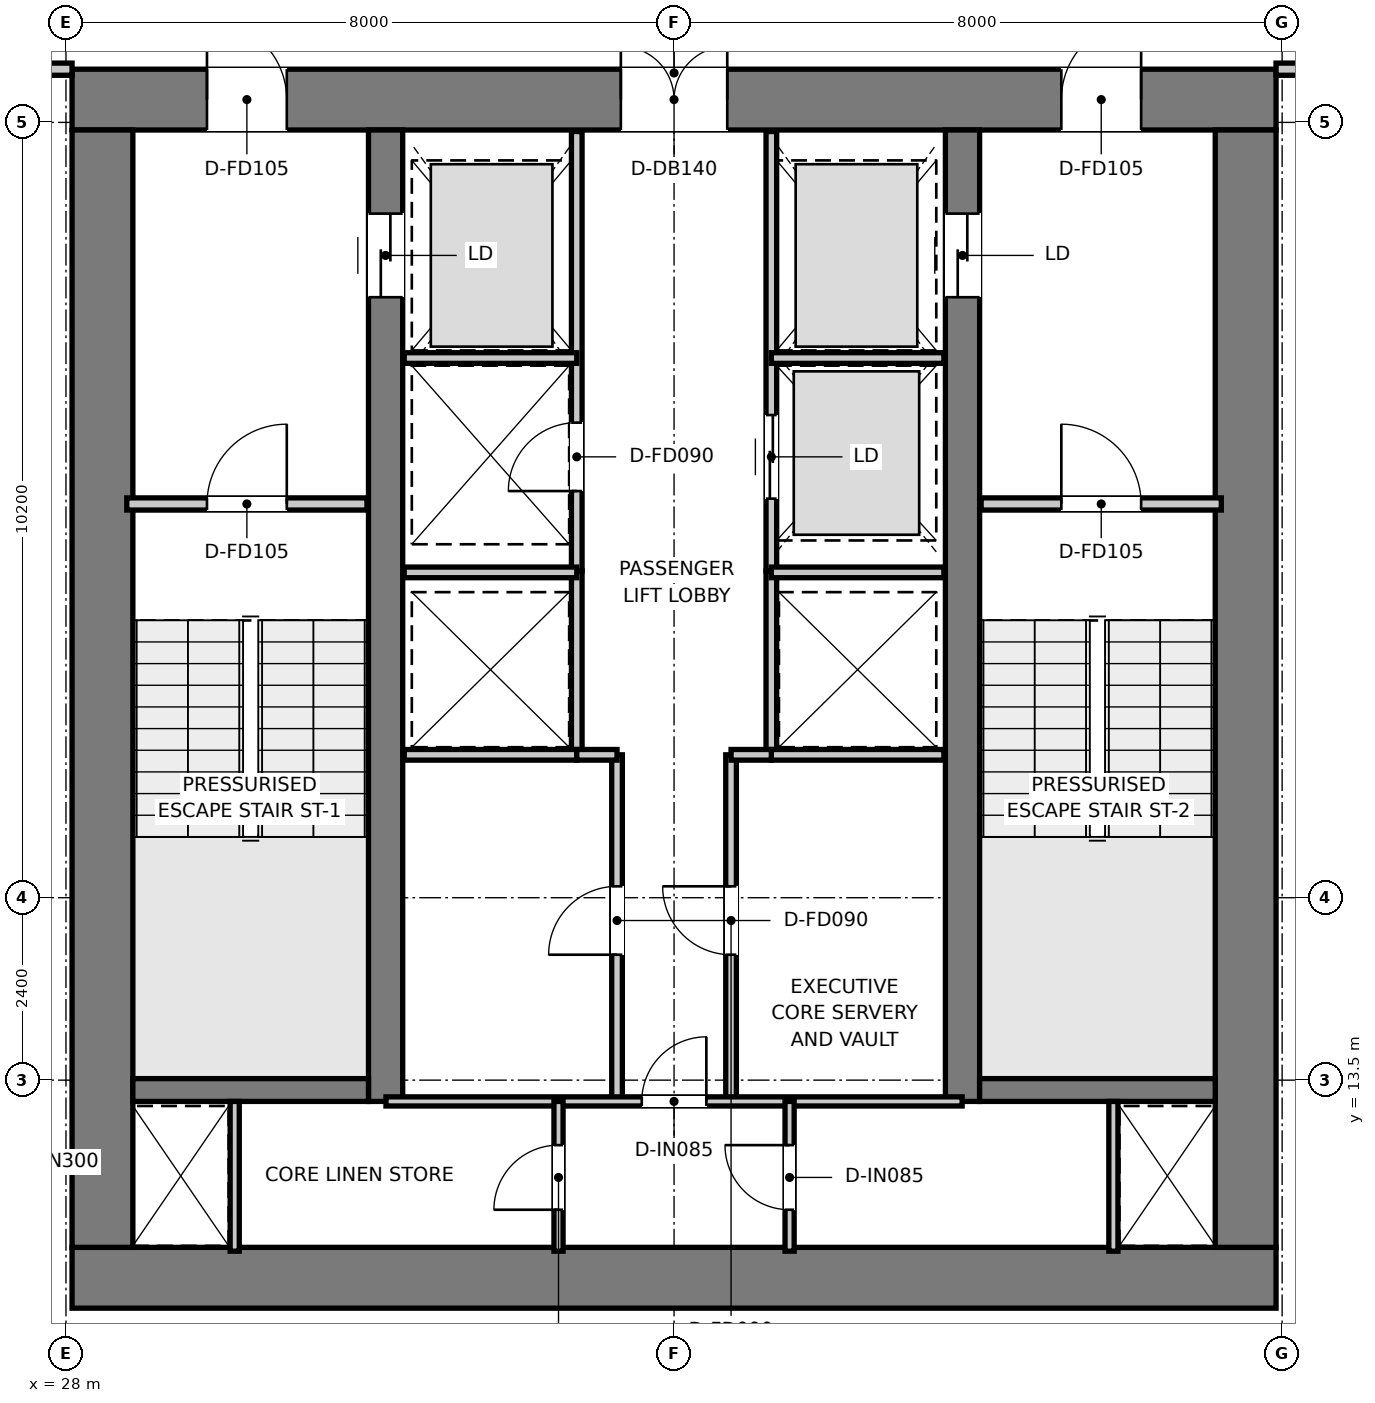
"""IFC4 building model, lengths in metres.
Left out: names, types, materials, properties, quantities, classifications, styles, units other than length and angle.
Written with IfcOpenShell. Run it as: python <this file> out.ifc"""

import sys

from ifc_helpers import new_model, si_unit, direction, frame, frame_2d, origin, place, context, subcontext, project, spatial, rectangle, extrude, element, fill, save


model = new_model("IFC4")
c1 = context("Model", 3, precision=1e-05, world=origin(), true_north=direction((0.0, 1.0)))
c2 = subcontext(c1, "Body", "Model", "MODEL_VIEW")
j1 = project(units=[si_unit("LENGTHUNIT", "METRE"), si_unit("PLANEANGLEUNIT", "RADIAN")], contexts=[c1])
p1 = place(None, origin())
s1 = spatial("IfcSite", under=j1, at=p1, CompositionType="ELEMENT")
p2 = place(p1, origin())
s2 = spatial("IfcBuilding", under=s1, at=p2, CompositionType="ELEMENT")
p3 = place(p2, frame((0.0, 0.0, 363.25)))
s3 = spatial("IfcBuildingStorey", under=s2, at=p3, CompositionType="ELEMENT", Elevation=363.25)
p4 = place(p3, frame((28.08, 10.9, 0.0), z_axis=(0.0, 0.0, 1.0), x_axis=(1.0, 0.0, 0.0)))
e1 = element("IfcWall", 1, at=p4, inside=s3, PredefinedType="SHEAR", context=c2, shape_type="SweptSolid", body=[
    extrude(rectangle(XDim=15.84, YDim=0.8, at=frame_2d((7.92, 0.0))), origin(), (0.0, 0.0, 1.0), 3.8),
])
p5 = place(p3, frame((28.08, 26.4, 0.0), z_axis=(0.0, 0.0, 1.0), x_axis=(1.0, 0.0, 0.0)))
e2 = element("IfcWall", 2, at=p5, inside=s3, PredefinedType="SHEAR", context=c2, shape_type="SweptSolid", body=[
    extrude(rectangle(XDim=15.84, YDim=0.8, at=frame_2d((7.92, 0.0))), origin(), (0.0, 0.0, 1.0), 3.8),
])
p6 = place(p5, frame((7.22, 0.0, 0.0)))
e3 = element("IfcOpeningElement", 3, at=p6, cuts=e2, PredefinedType="OPENING", context=c2, shape_type="SweptSolid", body=[
    extrude(rectangle(XDim=1.4, YDim=2.2, at=frame_2d((0.7, 1.1))), frame((0.0, 0.41, 0.0), z_axis=(0.0, -1.0, 0.0), x_axis=(1.0, 0.0, 0.0)), (0.0, 0.0, 1.0), 0.82),
])
p7 = place(p5, frame((1.775, 0.0, 0.0)))
e4 = element("IfcOpeningElement", 4, at=p7, cuts=e2, PredefinedType="OPENING", context=c2, shape_type="SweptSolid", body=[
    extrude(rectangle(XDim=1.05, YDim=2.1, at=frame_2d((0.525, 1.05))), frame((0.0, 0.41, 0.0), z_axis=(0.0, -1.0, 0.0), x_axis=(1.0, 0.0, 0.0)), (0.0, 0.0, 1.0), 0.82),
])
p8 = place(p5, frame((13.015, 0.0, 0.0)))
e5 = element("IfcOpeningElement", 5, at=p8, cuts=e2, PredefinedType="OPENING", context=c2, shape_type="SweptSolid", body=[
    extrude(rectangle(XDim=1.05, YDim=2.1, at=frame_2d((0.525, 1.05))), frame((0.0, 0.41, 0.0), z_axis=(0.0, -1.0, 0.0), x_axis=(1.0, 0.0, 0.0)), (0.0, 0.0, 1.0), 0.82),
])
for number, where, z_axis, x_axis in (
    (6, (28.48, 11.3, 0.0), (0.0, 0.0, 1.0), (0.0, 1.0, 0.0)),
    (7, (43.52, 11.3, 0.0), (0.0, 0.0, 1.0), (0.0, 1.0, 0.0)),
):
    element("IfcWall", number, at=place(p3, frame(where, z_axis=z_axis, x_axis=x_axis)), inside=s3, PredefinedType="SHEAR", context=c2, shape_type="SweptSolid", body=[
        extrude(rectangle(XDim=14.7, YDim=0.8, at=frame_2d((7.35, 0.0))), origin(), (0.0, 0.0, 1.0), 3.8),
    ])
p9 = place(p3, frame((32.205, 13.22, 0.0), z_axis=(0.0, 0.0, 1.0), x_axis=(0.0, 1.0, 0.0)))
e8 = element("IfcWall", 8, at=p9, inside=s3, PredefinedType="SHEAR", context=c2, shape_type="SweptSolid", body=[
    extrude(rectangle(XDim=12.78, YDim=0.45, at=frame_2d((6.39, 0.0))), origin(), (0.0, 0.0, 1.0), 3.8),
])
p10 = place(p9, frame((10.58, 0.0, 0.0)))
e9 = element("IfcOpeningElement", 9, at=p10, cuts=e8, PredefinedType="OPENING", context=c2, shape_type="SweptSolid", body=[
    extrude(rectangle(XDim=1.1, YDim=2.15, at=frame_2d((0.55, 1.075))), frame((0.0, 0.235, 0.0), z_axis=(0.0, -1.0, 0.0), x_axis=(1.0, 0.0, 0.0)), (0.0, 0.0, 1.0), 0.47),
])
p11 = place(p3, frame((39.795, 13.22, 0.0), z_axis=(0.0, 0.0, 1.0), x_axis=(0.0, 1.0, 0.0)))
e10 = element("IfcWall", 10, at=p11, inside=s3, PredefinedType="SHEAR", context=c2, shape_type="SweptSolid", body=[
    extrude(rectangle(XDim=12.78, YDim=0.45, at=frame_2d((6.39, 0.0))), origin(), (0.0, 0.0, 1.0), 3.8),
])
p12 = place(p11, frame((10.58, 0.0, 0.0)))
e11 = element("IfcOpeningElement", 11, at=p12, cuts=e10, PredefinedType="OPENING", context=c2, shape_type="SweptSolid", body=[
    extrude(rectangle(XDim=1.1, YDim=2.15, at=frame_2d((0.55, 1.075))), frame((0.0, 0.235, 0.0), z_axis=(0.0, -1.0, 0.0), x_axis=(1.0, 0.0, 0.0)), (0.0, 0.0, 1.0), 0.47),
])
for number, where, z_axis, x_axis in (
    (12, (28.88, 13.37, 0.0), (0.0, 0.0, 1.0), (1.0, 0.0, 0.0)),
    (13, (40.02, 13.37, 0.0), (0.0, 0.0, 1.0), (1.0, 0.0, 0.0)),
):
    element("IfcWall", number, at=place(p3, frame(where, z_axis=z_axis, x_axis=x_axis)), inside=s3, PredefinedType="SHEAR", context=c2, shape_type="SweptSolid", body=[
        extrude(rectangle(XDim=3.1, YDim=0.3, at=frame_2d((1.55, 0.0))), origin(), (0.0, 0.0, 1.0), 3.8),
    ])
p13 = place(p3, frame((28.8, 21.08, 0.0), z_axis=(0.0, 0.0, 1.0), x_axis=(1.0, 0.0, 0.0)))
e14 = element("IfcWall", 14, at=p13, inside=s3, PredefinedType="PARTITIONING", context=c2, shape_type="SweptSolid", body=[
    extrude(rectangle(XDim=3.16, YDim=0.16, at=frame_2d((1.58, 0.0))), origin(), (0.0, 0.0, 1.0), 3.5),
])
p14 = place(p13, frame((1.055, 0.0, 0.0)))
e15 = element("IfcOpeningElement", 15, at=p14, cuts=e14, PredefinedType="OPENING", context=c2, shape_type="SweptSolid", body=[
    extrude(rectangle(XDim=1.05, YDim=2.1, at=frame_2d((0.525, 1.05))), frame((0.0, 0.09, 0.0), z_axis=(0.0, -1.0, 0.0), x_axis=(1.0, 0.0, 0.0)), (0.0, 0.0, 1.0), 0.18),
])
p15 = place(p3, frame((40.04, 21.08, 0.0), z_axis=(0.0, 0.0, 1.0), x_axis=(1.0, 0.0, 0.0)))
e16 = element("IfcWall", 16, at=p15, inside=s3, PredefinedType="PARTITIONING", context=c2, shape_type="SweptSolid", body=[
    extrude(rectangle(XDim=3.16, YDim=0.16, at=frame_2d((1.58, 0.0))), origin(), (0.0, 0.0, 1.0), 3.5),
])
p16 = place(p15, frame((1.055, 0.0, 0.0)))
e17 = element("IfcOpeningElement", 17, at=p16, cuts=e16, PredefinedType="OPENING", context=c2, shape_type="SweptSolid", body=[
    extrude(rectangle(XDim=1.05, YDim=2.1, at=frame_2d((0.525, 1.05))), frame((0.0, 0.09, 0.0), z_axis=(0.0, -1.0, 0.0), x_axis=(1.0, 0.0, 0.0)), (0.0, 0.0, 1.0), 0.18),
])
p17 = place(p3, frame((34.72, 20.2, 0.0), z_axis=(0.0, 0.0, 1.0), x_axis=(0.0, 1.0, 0.0)))
e18 = element("IfcWall", 18, at=p17, inside=s3, PredefinedType="PARTITIONING", context=c2, shape_type="SweptSolid", body=[
    extrude(rectangle(XDim=5.78, YDim=0.14, at=frame_2d((2.89, 0.0))), origin(), (0.0, 0.0, 1.0), 2.65),
])
p18 = place(p17, frame((1.05, 0.0, 0.0)))
e19 = element("IfcOpeningElement", 19, at=p18, cuts=e18, PredefinedType="OPENING", context=c2, shape_type="SweptSolid", body=[
    extrude(rectangle(XDim=0.9, YDim=2.1, at=frame_2d((0.45, 1.05))), frame((0.0, 0.08, 0.0), z_axis=(0.0, -1.0, 0.0), x_axis=(1.0, 0.0, 0.0)), (0.0, 0.0, 1.0), 0.16),
])
p19 = place(p3, frame((37.28, 20.2, 0.0), z_axis=(0.0, 0.0, 1.0), x_axis=(0.0, 1.0, 0.0)))
e20 = element("IfcWall", 20, at=p19, inside=s3, PredefinedType="PARTITIONING", context=c2, shape_type="SweptSolid", body=[
    extrude(rectangle(XDim=5.78, YDim=0.14, at=frame_2d((2.89, 0.0))), origin(), (0.0, 0.0, 1.0), 2.65),
])
p20 = place(p19, frame((0.95, 0.0, 0.0)))
e21 = element("IfcOpeningElement", 21, at=p20, cuts=e20, PredefinedType="OPENING", context=c2, shape_type="SweptSolid", body=[
    extrude(rectangle(XDim=1.1, YDim=2.15, at=frame_2d((0.55, 1.075))), frame((0.0, 0.08, 0.0), z_axis=(0.0, -1.0, 0.0), x_axis=(1.0, 0.0, 0.0)), (0.0, 0.0, 1.0), 0.16),
])
for number, where, z_axis, x_axis in (
    (22, (32.45, 23.0, 0.0), (0.0, 0.0, 1.0), (1.0, 0.0, 0.0)),
    (23, (37.28, 23.0, 0.0), (0.0, 0.0, 1.0), (1.0, 0.0, 0.0)),
):
    element("IfcWall", number, at=place(p3, frame(where, z_axis=z_axis, x_axis=x_axis)), inside=s3, PredefinedType="PARTITIONING", context=c2, shape_type="SweptSolid", body=[
        extrude(rectangle(XDim=2.27, YDim=0.14, at=frame_2d((1.135, 0.0))), origin(), (0.0, 0.0, 1.0), 2.65),
    ])
for number, where, z_axis, x_axis in (
    (24, (34.72, 17.78, 0.0), (0.0, 0.0, 1.0), (0.0, 1.0, 0.0)),
    (25, (37.28, 17.78, 0.0), (0.0, 0.0, 1.0), (0.0, 1.0, 0.0)),
):
    element("IfcWall", number, at=place(p3, frame(where, z_axis=z_axis, x_axis=x_axis)), inside=s3, PredefinedType="PARTITIONING", context=c2, shape_type="SweptSolid", body=[
        extrude(rectangle(XDim=2.42, YDim=0.14, at=frame_2d((1.21, 0.0))), origin(), (0.0, 0.0, 1.0), 3.5),
    ])
for number, where, z_axis, x_axis in (
    (26, (32.45, 17.78, 0.0), (0.0, 0.0, 1.0), (1.0, 0.0, 0.0)),
    (27, (32.45, 20.18, 0.0), (0.0, 0.0, 1.0), (1.0, 0.0, 0.0)),
    (28, (37.28, 17.78, 0.0), (0.0, 0.0, 1.0), (1.0, 0.0, 0.0)),
    (29, (37.28, 20.18, 0.0), (0.0, 0.0, 1.0), (1.0, 0.0, 0.0)),
):
    element("IfcWall", number, at=place(p3, frame(where, z_axis=z_axis, x_axis=x_axis)), inside=s3, PredefinedType="PARTITIONING", context=c2, shape_type="SweptSolid", body=[
        extrude(rectangle(XDim=2.27, YDim=0.14, at=frame_2d((1.135, 0.0))), origin(), (0.0, 0.0, 1.0), 3.5),
    ])
p21 = place(p3, frame((35.25, 13.22, 0.0), z_axis=(0.0, 0.0, 1.0), x_axis=(0.0, 1.0, 0.0)))
e30 = element("IfcWall", 30, at=p21, inside=s3, PredefinedType="PARTITIONING", context=c2, shape_type="SweptSolid", body=[
    extrude(rectangle(XDim=4.56, YDim=0.14, at=frame_2d((2.28, 0.0))), origin(), (0.0, 0.0, 1.0), 3.5),
])
p22 = place(p21, frame((1.93, 0.0, 0.0)))
e31 = element("IfcOpeningElement", 31, at=p22, cuts=e30, PredefinedType="OPENING", context=c2, shape_type="SweptSolid", body=[
    extrude(rectangle(XDim=0.9, YDim=2.1, at=frame_2d((0.45, 1.05))), frame((0.0, 0.08, 0.0), z_axis=(0.0, -1.0, 0.0), x_axis=(1.0, 0.0, 0.0)), (0.0, 0.0, 1.0), 0.16),
])
p23 = place(p3, frame((34.72, 17.78, 0.0), z_axis=(0.0, 0.0, 1.0), x_axis=(1.0, 0.0, 0.0)))
e32 = element("IfcWall", 32, at=p23, inside=s3, PredefinedType="PARTITIONING", context=c2, shape_type="SweptSolid", body=[
    extrude(rectangle(XDim=0.53, YDim=0.14, at=frame_2d((0.265, 0.0))), origin(), (0.0, 0.0, 1.0), 3.5),
])
p24 = place(p3, frame((36.75, 13.22, 0.0), z_axis=(0.0, 0.0, 1.0), x_axis=(0.0, 1.0, 0.0)))
e33 = element("IfcWall", 33, at=p24, inside=s3, PredefinedType="PARTITIONING", context=c2, shape_type="SweptSolid", body=[
    extrude(rectangle(XDim=4.56, YDim=0.14, at=frame_2d((2.28, 0.0))), origin(), (0.0, 0.0, 1.0), 3.5),
])
p25 = place(p24, frame((1.93, 0.0, 0.0)))
e34 = element("IfcOpeningElement", 34, at=p25, cuts=e33, PredefinedType="OPENING", context=c2, shape_type="SweptSolid", body=[
    extrude(rectangle(XDim=0.9, YDim=2.1, at=frame_2d((0.45, 1.05))), frame((0.0, 0.08, 0.0), z_axis=(0.0, -1.0, 0.0), x_axis=(1.0, 0.0, 0.0)), (0.0, 0.0, 1.0), 0.16),
])
p26 = place(p3, frame((36.75, 17.78, 0.0), z_axis=(0.0, 0.0, 1.0), x_axis=(1.0, 0.0, 0.0)))
e35 = element("IfcWall", 35, at=p26, inside=s3, PredefinedType="PARTITIONING", context=c2, shape_type="SweptSolid", body=[
    extrude(rectangle(XDim=0.53, YDim=0.14, at=frame_2d((0.265, 0.0))), origin(), (0.0, 0.0, 1.0), 3.5),
])
for number, where, z_axis, x_axis in (
    (36, (30.22, 11.25, 0.0), (0.0, 0.0, 1.0), (0.0, 1.0, 0.0)),
    (37, (41.78, 11.25, 0.0), (0.0, 0.0, 1.0), (0.0, 1.0, 0.0)),
):
    element("IfcWall", number, at=place(p3, frame(where, z_axis=z_axis, x_axis=x_axis)), inside=s3, PredefinedType="PARTITIONING", context=c2, shape_type="SweptSolid", body=[
        extrude(rectangle(XDim=1.97, YDim=0.12, at=frame_2d((0.985, 0.0))), origin(), (0.0, 0.0, 1.0), 3.5),
    ])
p27 = place(p3, frame((32.21, 13.22, 0.0), z_axis=(0.0, 0.0, 1.0), x_axis=(1.0, 0.0, 0.0)))
e38 = element("IfcWall", 38, at=p27, inside=s3, PredefinedType="PARTITIONING", context=c2, shape_type="SweptSolid", body=[
    extrude(rectangle(XDim=7.58, YDim=0.12, at=frame_2d((3.79, 0.0))), origin(), (0.0, 0.0, 1.0), 3.5),
])
p28 = place(p27, frame((3.365, 0.0, 0.0)))
e39 = element("IfcOpeningElement", 39, at=p28, cuts=e38, PredefinedType="OPENING", context=c2, shape_type="SweptSolid", body=[
    extrude(rectangle(XDim=0.85, YDim=2.1, at=frame_2d((0.425, 1.05))), frame((0.0, 0.07, 0.0), z_axis=(0.0, -1.0, 0.0), x_axis=(1.0, 0.0, 0.0)), (0.0, 0.0, 1.0), 0.14),
])
p29 = place(p3, frame((34.48, 11.25, 0.0), z_axis=(0.0, 0.0, 1.0), x_axis=(0.0, 1.0, 0.0)))
e40 = element("IfcWall", 40, at=p29, inside=s3, PredefinedType="PARTITIONING", context=c2, shape_type="SweptSolid", body=[
    extrude(rectangle(XDim=1.97, YDim=0.12, at=frame_2d((0.985, 0.0))), origin(), (0.0, 0.0, 1.0), 3.5),
])
p30 = place(p29, frame((0.545, 0.0, 0.0)))
e41 = element("IfcOpeningElement", 41, at=p30, cuts=e40, PredefinedType="OPENING", context=c2, shape_type="SweptSolid", body=[
    extrude(rectangle(XDim=0.85, YDim=2.1, at=frame_2d((0.425, 1.05))), frame((0.0, 0.07, 0.0), z_axis=(0.0, -1.0, 0.0), x_axis=(1.0, 0.0, 0.0)), (0.0, 0.0, 1.0), 0.14),
])
p31 = place(p3, frame((37.52, 11.25, 0.0), z_axis=(0.0, 0.0, 1.0), x_axis=(0.0, 1.0, 0.0)))
e42 = element("IfcWall", 42, at=p31, inside=s3, PredefinedType="PARTITIONING", context=c2, shape_type="SweptSolid", body=[
    extrude(rectangle(XDim=1.97, YDim=0.12, at=frame_2d((0.985, 0.0))), origin(), (0.0, 0.0, 1.0), 3.5),
])
p32 = place(p31, frame((0.545, 0.0, 0.0)))
e43 = element("IfcOpeningElement", 43, at=p32, cuts=e42, PredefinedType="OPENING", context=c2, shape_type="SweptSolid", body=[
    extrude(rectangle(XDim=0.85, YDim=2.1, at=frame_2d((0.425, 1.05))), frame((0.0, 0.07, 0.0), z_axis=(0.0, -1.0, 0.0), x_axis=(1.0, 0.0, 0.0)), (0.0, 0.0, 1.0), 0.14),
])
for number, where, z_axis, x_axis in (
    (44, (26.4, 26.8, 0.0), (0.0, 0.0, 1.0), (1.0, 0.0, 0.0)),
    (45, (43.92, 26.8, 0.0), (0.0, 0.0, 1.0), (1.0, 0.0, 0.0)),
):
    element("IfcWall", number, at=place(p3, frame(where, z_axis=z_axis, x_axis=x_axis)), inside=s3, PredefinedType="PARTITIONING", context=c2, shape_type="SweptSolid", body=[
        extrude(rectangle(XDim=1.68, YDim=0.16, at=frame_2d((0.84, 0.0))), origin(), (0.0, 0.0, 1.0), 3.5),
    ])
p33 = place(p14, origin())
e46 = element("IfcDoor", 46, at=p33, inside=s3, OperationType="SINGLE_SWING_RIGHT", PredefinedType="DOOR", context=c2, shape_type="SweptSolid", body=[
    extrude(rectangle(XDim=1.05, YDim=2.1, at=frame_2d((0.525, 1.05))), frame((0.0, 0.025, 0.0), z_axis=(0.0, -1.0, 0.0), x_axis=(1.0, 0.0, 0.0)), (0.0, 0.0, 1.0), 0.05),
])
fill(e15, e46)
p34 = place(p16, origin())
e47 = element("IfcDoor", 47, at=p34, inside=s3, OperationType="SINGLE_SWING_LEFT", PredefinedType="DOOR", context=c2, shape_type="SweptSolid", body=[
    extrude(rectangle(XDim=1.05, YDim=2.1, at=frame_2d((0.525, 1.05))), frame((0.0, 0.025, 0.0), z_axis=(0.0, -1.0, 0.0), x_axis=(1.0, 0.0, 0.0)), (0.0, 0.0, 1.0), 0.05),
])
fill(e17, e47)
p35 = place(p6, origin())
e48 = element("IfcDoor", 48, at=p35, inside=s3, OperationType="DOUBLE_DOOR_SINGLE_SWING", PredefinedType="DOOR", context=c2, shape_type="SweptSolid", body=[
    extrude(rectangle(XDim=1.4, YDim=2.2, at=frame_2d((0.7, 1.1))), frame((0.0, 0.025, 0.0), z_axis=(0.0, -1.0, 0.0), x_axis=(1.0, 0.0, 0.0)), (0.0, 0.0, 1.0), 0.05),
])
fill(e3, e48)
p36 = place(p7, origin())
e49 = element("IfcDoor", 49, at=p36, inside=s3, OperationType="SINGLE_SWING_LEFT", PredefinedType="DOOR", context=c2, shape_type="SweptSolid", body=[
    extrude(rectangle(XDim=1.05, YDim=2.1, at=frame_2d((0.525, 1.05))), frame((0.0, 0.025, 0.0), z_axis=(0.0, -1.0, 0.0), x_axis=(1.0, 0.0, 0.0)), (0.0, 0.0, 1.0), 0.05),
])
fill(e4, e49)
p37 = place(p8, origin())
e50 = element("IfcDoor", 50, at=p37, inside=s3, OperationType="SINGLE_SWING_RIGHT", PredefinedType="DOOR", context=c2, shape_type="SweptSolid", body=[
    extrude(rectangle(XDim=1.05, YDim=2.1, at=frame_2d((0.525, 1.05))), frame((0.0, 0.025, 0.0), z_axis=(0.0, -1.0, 0.0), x_axis=(1.0, 0.0, 0.0)), (0.0, 0.0, 1.0), 0.05),
])
fill(e5, e50)
p38 = place(p10, origin())
e51 = element("IfcDoor", 51, at=p38, inside=s3, OperationType="DOUBLE_DOOR_SLIDING", PredefinedType="DOOR", context=c2, shape_type="SweptSolid", body=[
    extrude(rectangle(XDim=1.1, YDim=2.15, at=frame_2d((0.55, 1.075))), frame((0.0, 0.025, 0.0), z_axis=(0.0, -1.0, 0.0), x_axis=(1.0, 0.0, 0.0)), (0.0, 0.0, 1.0), 0.05),
])
fill(e9, e51)
p39 = place(p12, origin())
e52 = element("IfcDoor", 52, at=p39, inside=s3, OperationType="DOUBLE_DOOR_SLIDING", PredefinedType="DOOR", context=c2, shape_type="SweptSolid", body=[
    extrude(rectangle(XDim=1.1, YDim=2.15, at=frame_2d((0.55, 1.075))), frame((0.0, 0.025, 0.0), z_axis=(0.0, -1.0, 0.0), x_axis=(1.0, 0.0, 0.0)), (0.0, 0.0, 1.0), 0.05),
])
fill(e11, e52)
p40 = place(p18, origin())
e53 = element("IfcDoor", 53, at=p40, inside=s3, OperationType="SINGLE_SWING_LEFT", PredefinedType="DOOR", context=c2, shape_type="SweptSolid", body=[
    extrude(rectangle(XDim=0.9, YDim=2.1, at=frame_2d((0.45, 1.05))), frame((0.0, 0.025, 0.0), z_axis=(0.0, -1.0, 0.0), x_axis=(1.0, 0.0, 0.0)), (0.0, 0.0, 1.0), 0.05),
])
fill(e19, e53)
p41 = place(p20, origin())
e54 = element("IfcDoor", 54, at=p41, inside=s3, OperationType="DOUBLE_DOOR_SLIDING", PredefinedType="DOOR", context=c2, shape_type="SweptSolid", body=[
    extrude(rectangle(XDim=1.1, YDim=2.15, at=frame_2d((0.55, 1.075))), frame((0.0, 0.025, 0.0), z_axis=(0.0, -1.0, 0.0), x_axis=(1.0, 0.0, 0.0)), (0.0, 0.0, 1.0), 0.05),
])
fill(e21, e54)
p42 = place(p22, origin())
e55 = element("IfcDoor", 55, at=p42, inside=s3, OperationType="SINGLE_SWING_LEFT", PredefinedType="DOOR", context=c2, shape_type="SweptSolid", body=[
    extrude(rectangle(XDim=0.9, YDim=2.1, at=frame_2d((0.45, 1.05))), frame((0.0, 0.025, 0.0), z_axis=(0.0, -1.0, 0.0), x_axis=(1.0, 0.0, 0.0)), (0.0, 0.0, 1.0), 0.05),
])
fill(e31, e55)
p43 = place(p25, origin())
e56 = element("IfcDoor", 56, at=p43, inside=s3, OperationType="SINGLE_SWING_RIGHT", PredefinedType="DOOR", context=c2, shape_type="SweptSolid", body=[
    extrude(rectangle(XDim=0.9, YDim=2.1, at=frame_2d((0.45, 1.05))), frame((0.0, 0.025, 0.0), z_axis=(0.0, -1.0, 0.0), x_axis=(1.0, 0.0, 0.0)), (0.0, 0.0, 1.0), 0.05),
])
fill(e34, e56)
p44 = place(p28, origin())
e57 = element("IfcDoor", 57, at=p44, inside=s3, OperationType="SINGLE_SWING_RIGHT", PredefinedType="DOOR", context=c2, shape_type="SweptSolid", body=[
    extrude(rectangle(XDim=0.85, YDim=2.1, at=frame_2d((0.425, 1.05))), frame((0.0, 0.025, 0.0), z_axis=(0.0, -1.0, 0.0), x_axis=(1.0, 0.0, 0.0)), (0.0, 0.0, 1.0), 0.05),
])
fill(e39, e57)
p45 = place(p30, origin())
e58 = element("IfcDoor", 58, at=p45, inside=s3, OperationType="SINGLE_SWING_LEFT", PredefinedType="DOOR", context=c2, shape_type="SweptSolid", body=[
    extrude(rectangle(XDim=0.85, YDim=2.1, at=frame_2d((0.425, 1.05))), frame((0.0, 0.025, 0.0), z_axis=(0.0, -1.0, 0.0), x_axis=(1.0, 0.0, 0.0)), (0.0, 0.0, 1.0), 0.05),
])
fill(e41, e58)
p46 = place(p32, origin())
e59 = element("IfcDoor", 59, at=p46, inside=s3, OperationType="SINGLE_SWING_RIGHT", PredefinedType="DOOR", context=c2, shape_type="SweptSolid", body=[
    extrude(rectangle(XDim=0.85, YDim=2.1, at=frame_2d((0.425, 1.05))), frame((0.0, 0.025, 0.0), z_axis=(0.0, -1.0, 0.0), x_axis=(1.0, 0.0, 0.0)), (0.0, 0.0, 1.0), 0.05),
])
fill(e43, e59)
save(model, sys.argv[1])
